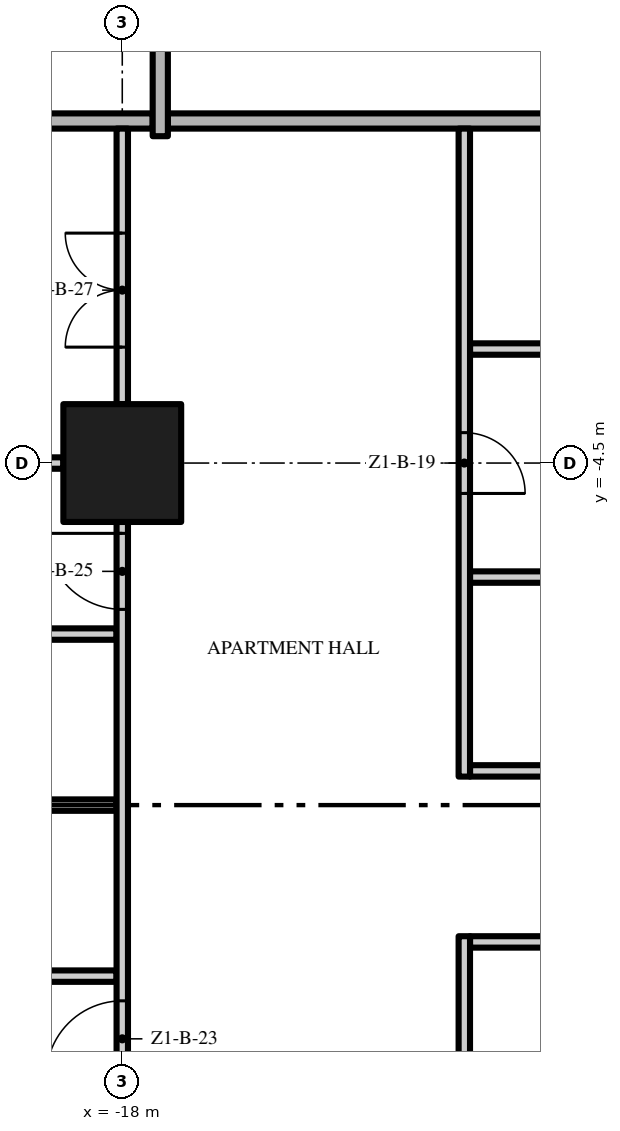
"""IFC4 building model, lengths in metres.
Left out: names, types, materials, properties, quantities, classifications, styles, units other than length and angle.
Written with IfcOpenShell. Run it as: python <this file> out.ifc"""

import sys

from ifc_helpers import new_model, si_unit, direction, frame, frame_2d, origin, origin_2d, place, context, subcontext, project, spatial, rectangle, extrude, element, fill, save


model = new_model("IFC4")
c1 = context("Model", 3, precision=1e-05, world=origin(), true_north=direction((0.0, 1.0)))
c2 = subcontext(c1, "Body", "Model", "MODEL_VIEW")
j1 = project(units=[si_unit("LENGTHUNIT", "METRE"), si_unit("PLANEANGLEUNIT", "RADIAN")], contexts=[c1])
p1 = place(None, origin())
s1 = spatial("IfcSite", under=j1, at=p1, CompositionType="ELEMENT")
p2 = place(p1, origin())
s2 = spatial("IfcBuilding", under=s1, at=p2, CompositionType="ELEMENT")
p3 = place(p2, frame((0.0, 0.0, 34.0)))
s3 = spatial("IfcBuildingStorey", under=s2, at=p3, CompositionType="ELEMENT", Elevation=34.0)
p4 = place(p3, frame((-18.0, -4.5, 0.0), z_axis=(0.0, 0.0, 1.0), x_axis=(1.0, 0.0, 0.0)))
e1 = element("IfcColumn", 1, at=p4, inside=s3, PredefinedType="COLUMN", context=c2, shape_type="SweptSolid", body=[
    extrude(rectangle(XDim=1.55, YDim=1.55, at=origin_2d()), origin(), (0.0, 0.0, 1.0), 3.5),
])
p5 = place(p3, frame((-20.925, -11.25, 0.0), z_axis=(0.0, 0.0, 1.0), x_axis=(1.0, 0.0, 0.0)))
e2 = element("IfcWall", 2, at=p5, inside=s3, PredefinedType="PARTITIONING", context=c2, shape_type="SweptSolid", body=[
    extrude(rectangle(XDim=2.85, YDim=0.15, at=frame_2d((1.425, 0.0))), origin(), (0.0, 0.0, 1.0), 3.5),
])
p6 = place(p3, frame((-9.075, -10.8, 0.0), z_axis=(0.0, 0.0, 1.0), x_axis=(-1.0, 0.0, 0.0)))
e3 = element("IfcWall", 3, at=p6, inside=s3, PredefinedType="PARTITIONING", context=c2, shape_type="SweptSolid", body=[
    extrude(rectangle(XDim=4.35, YDim=0.15, at=frame_2d((2.175, 0.0))), origin(), (0.0, 0.0, 1.0), 3.5),
])
p7 = place(p6, frame((1.7, 0.0, 0.0)))
e4 = element("IfcOpeningElement", 4, at=p7, cuts=e3, PredefinedType="OPENING", context=c2, shape_type="SweptSolid", body=[
    extrude(rectangle(XDim=0.9, YDim=2.1, at=frame_2d((0.45, 1.05))), frame((0.0, 0.085, 0.0), z_axis=(0.0, -1.0, 0.0), x_axis=(1.0, 0.0, 0.0)), (0.0, 0.0, 1.0), 0.17),
])
p8 = place(p3, frame((-20.925, -9.0, 0.0), z_axis=(0.0, 0.0, 1.0), x_axis=(1.0, 0.0, 0.0)))
e5 = element("IfcWall", 5, at=p8, inside=s3, PredefinedType="PARTITIONING", context=c2, shape_type="SweptSolid", body=[
    extrude(rectangle(XDim=2.85, YDim=0.15, at=frame_2d((1.425, 0.0))), origin(), (0.0, 0.0, 1.0), 3.5),
])
p9 = place(p3, frame((-13.425, -8.55, 0.0), z_axis=(0.0, 0.0, 1.0), x_axis=(1.0, 0.0, 0.0)))
e6 = element("IfcWall", 6, at=p9, inside=s3, PredefinedType="PARTITIONING", context=c2, shape_type="SweptSolid", body=[
    extrude(rectangle(XDim=4.35, YDim=0.15, at=frame_2d((2.175, 0.0))), origin(), (0.0, 0.0, 1.0), 3.5),
])
p10 = place(p3, frame((-20.925, -6.75, 0.0), z_axis=(0.0, 0.0, 1.0), x_axis=(1.0, 0.0, 0.0)))
e7 = element("IfcWall", 7, at=p10, inside=s3, PredefinedType="PARTITIONING", context=c2, shape_type="SweptSolid", body=[
    extrude(rectangle(XDim=2.85, YDim=0.15, at=frame_2d((1.425, 0.0))), origin(), (0.0, 0.0, 1.0), 3.5),
])
p11 = place(p3, frame((-13.425, -6.0, 0.0), z_axis=(0.0, 0.0, 1.0), x_axis=(1.0, 0.0, 0.0)))
e8 = element("IfcWall", 8, at=p11, inside=s3, PredefinedType="PARTITIONING", context=c2, shape_type="SweptSolid", body=[
    extrude(rectangle(XDim=4.35, YDim=0.15, at=frame_2d((2.175, 0.0))), origin(), (0.0, 0.0, 1.0), 3.5),
])
p12 = place(p3, frame((-25.55, -4.5, 0.0), z_axis=(0.0, 0.0, 1.0), x_axis=(1.0, 0.0, 0.0)))
e9 = element("IfcWall", 9, at=p12, inside=s3, PredefinedType="PARTITIONING", context=c2, shape_type="SweptSolid", body=[
    extrude(rectangle(XDim=6.775, YDim=0.15, at=frame_2d((3.388, 0.0))), origin(), (0.0, 0.0, 1.0), 3.5),
])
p13 = place(p3, frame((-13.425, -3.0, 0.0), z_axis=(0.0, 0.0, 1.0), x_axis=(1.0, 0.0, 0.0)))
e10 = element("IfcWall", 10, at=p13, inside=s3, PredefinedType="PARTITIONING", context=c2, shape_type="SweptSolid", body=[
    extrude(rectangle(XDim=4.35, YDim=0.15, at=frame_2d((2.175, 0.0))), origin(), (0.0, 0.0, 1.0), 3.5),
])
p14 = place(p3, frame((-17.4, 0.0, 0.0), z_axis=(0.0, 0.0, 1.0), x_axis=(1.0, 0.0, 0.0)))
e11 = element("IfcWall", 11, at=p14, inside=s3, PredefinedType="PARTITIONING", context=c2, shape_type="SweptSolid", body=[
    extrude(rectangle(XDim=12.8, YDim=0.2, at=frame_2d((6.4, 0.0))), origin(), (0.0, 0.0, 1.0), 3.5),
])
p15 = place(p3, frame((-26.7, 0.0, 0.0), z_axis=(0.0, 0.0, 1.0), x_axis=(1.0, 0.0, 0.0)))
e12 = element("IfcWall", 12, at=p15, inside=s3, PredefinedType="PARTITIONING", context=c2, shape_type="SweptSolid", body=[
    extrude(rectangle(XDim=9.1, YDim=0.2, at=frame_2d((4.55, 0.0))), origin(), (0.0, 0.0, 1.0), 3.5),
])
p16 = place(p3, frame((-18.0, -12.725, 0.0), z_axis=(0.0, 0.0, 1.0), x_axis=(0.0, 1.0, 0.0)))
e13 = element("IfcWall", 13, at=p16, inside=s3, PredefinedType="PARTITIONING", context=c2, shape_type="SweptSolid", body=[
    extrude(rectangle(XDim=7.45, YDim=0.15, at=frame_2d((3.725, 0.0))), origin(), (0.0, 0.0, 1.0), 3.5),
])
p17 = place(p16, frame((0.15, 0.0, 0.0)))
e14 = element("IfcOpeningElement", 14, at=p17, cuts=e13, PredefinedType="OPENING", context=c2, shape_type="SweptSolid", body=[
    extrude(rectangle(XDim=1.0, YDim=2.4, at=frame_2d((0.5, 1.2))), frame((0.0, 0.085, 0.0), z_axis=(0.0, -1.0, 0.0), x_axis=(1.0, 0.0, 0.0)), (0.0, 0.0, 1.0), 0.17),
])
p18 = place(p16, frame((6.3, 0.0, 0.0)))
e15 = element("IfcOpeningElement", 15, at=p18, cuts=e13, PredefinedType="OPENING", context=c2, shape_type="SweptSolid", body=[
    extrude(rectangle(XDim=1.0, YDim=2.4, at=frame_2d((0.5, 1.2))), frame((0.0, 0.085, 0.0), z_axis=(0.0, -1.0, 0.0), x_axis=(1.0, 0.0, 0.0)), (0.0, 0.0, 1.0), 0.17),
])
p19 = place(p3, frame((-18.0, -3.725, 0.0), z_axis=(0.0, 0.0, 1.0), x_axis=(0.0, 1.0, 0.0)))
e16 = element("IfcWall", 16, at=p19, inside=s3, PredefinedType="PARTITIONING", context=c2, shape_type="SweptSolid", body=[
    extrude(rectangle(XDim=3.625, YDim=0.15, at=frame_2d((1.812, 0.0))), origin(), (0.0, 0.0, 1.0), 3.5),
])
p20 = place(p19, frame((0.75, 0.0, 0.0)))
e17 = element("IfcOpeningElement", 17, at=p20, cuts=e16, PredefinedType="OPENING", context=c2, shape_type="SweptSolid", body=[
    extrude(rectangle(XDim=1.5, YDim=2.4, at=frame_2d((0.75, 1.2))), frame((0.0, 0.085, 0.0), z_axis=(0.0, -1.0, 0.0), x_axis=(1.0, 0.0, 0.0)), (0.0, 0.0, 1.0), 0.17),
])
p21 = place(p3, frame((-17.5, -0.2, 0.0), z_axis=(0.0, 0.0, 1.0), x_axis=(0.0, 1.0, 0.0)))
e18 = element("IfcWall", 18, at=p21, inside=s3, PredefinedType="PARTITIONING", context=c2, shape_type="SweptSolid", body=[
    extrude(rectangle(XDim=3.925, YDim=0.2, at=frame_2d((1.962, 0.0))), origin(), (0.0, 0.0, 1.0), 3.5),
])
p22 = place(p3, frame((-13.5, -10.725, 0.0), z_axis=(0.0, 0.0, 1.0), x_axis=(0.0, -1.0, 0.0)))
e19 = element("IfcWall", 19, at=p22, inside=s3, PredefinedType="PARTITIONING", context=c2, shape_type="SweptSolid", body=[
    extrude(rectangle(XDim=11.475, YDim=0.15, at=frame_2d((5.737, 0.0))), origin(), (0.0, 0.0, 1.0), 3.5),
])
p23 = place(p22, frame((10.475, 0.0, 0.0)))
e20 = element("IfcOpeningElement", 20, at=p23, cuts=e19, PredefinedType="OPENING", context=c2, shape_type="SweptSolid", body=[
    extrude(rectangle(XDim=0.8, YDim=2.0, at=frame_2d((0.4, 1.0))), frame((0.0, 0.085, 0.0), z_axis=(0.0, -1.0, 0.0), x_axis=(1.0, 0.0, 0.0)), (0.0, 0.0, 1.0), 0.17),
])
p24 = place(p22, frame((4.825, 0.0, 0.0)))
e21 = element("IfcOpeningElement", 21, at=p24, cuts=e19, PredefinedType="OPENING", context=c2, shape_type="SweptSolid", body=[
    extrude(rectangle(XDim=1.0, YDim=2.4, at=frame_2d((0.5, 1.2))), frame((0.0, 0.085, 0.0), z_axis=(0.0, -1.0, 0.0), x_axis=(1.0, 0.0, 0.0)), (0.0, 0.0, 1.0), 0.17),
])
p25 = place(p3, frame((-13.5, -0.1, 0.0), z_axis=(0.0, 0.0, 1.0), x_axis=(0.0, -1.0, 0.0)))
e22 = element("IfcWall", 22, at=p25, inside=s3, PredefinedType="PARTITIONING", context=c2, shape_type="SweptSolid", body=[
    extrude(rectangle(XDim=8.525, YDim=0.15, at=frame_2d((4.263, 0.0))), origin(), (0.0, 0.0, 1.0), 3.5),
])
p26 = place(p25, frame((4.0, 0.0, 0.0)))
e23 = element("IfcOpeningElement", 23, at=p26, cuts=e22, PredefinedType="OPENING", context=c2, shape_type="SweptSolid", body=[
    extrude(rectangle(XDim=0.8, YDim=2.0, at=frame_2d((0.4, 1.0))), frame((0.0, 0.085, 0.0), z_axis=(0.0, -1.0, 0.0), x_axis=(1.0, 0.0, 0.0)), (0.0, 0.0, 1.0), 0.17),
])
p27 = place(p26, origin())
e24 = element("IfcDoor", 24, at=p27, inside=s3, OperationType="SINGLE_SWING_RIGHT", PredefinedType="DOOR", context=c2, shape_type="SweptSolid", body=[
    extrude(rectangle(XDim=0.8, YDim=2.0, at=frame_2d((0.4, 1.0))), frame((0.0, 0.025, 0.0), z_axis=(0.0, -1.0, 0.0), x_axis=(1.0, 0.0, 0.0)), (0.0, 0.0, 1.0), 0.05),
])
fill(e23, e24)
p28 = place(p17, origin())
e25 = element("IfcDoor", 25, at=p28, inside=s3, OperationType="SINGLE_SWING_LEFT", PredefinedType="DOOR", context=c2, shape_type="SweptSolid", body=[
    extrude(rectangle(XDim=1.0, YDim=2.4, at=frame_2d((0.5, 1.2))), frame((0.0, 0.025, 0.0), z_axis=(0.0, -1.0, 0.0), x_axis=(1.0, 0.0, 0.0)), (0.0, 0.0, 1.0), 0.05),
])
fill(e14, e25)
p29 = place(p18, origin())
e26 = element("IfcDoor", 26, at=p29, inside=s3, OperationType="SINGLE_SWING_RIGHT", PredefinedType="DOOR", context=c2, shape_type="SweptSolid", body=[
    extrude(rectangle(XDim=1.0, YDim=2.4, at=frame_2d((0.5, 1.2))), frame((0.0, 0.025, 0.0), z_axis=(0.0, -1.0, 0.0), x_axis=(1.0, 0.0, 0.0)), (0.0, 0.0, 1.0), 0.05),
])
fill(e15, e26)
p30 = place(p20, origin())
e27 = element("IfcDoor", 27, at=p30, inside=s3, OperationType="DOUBLE_DOOR_SINGLE_SWING", PredefinedType="DOOR", context=c2, shape_type="SweptSolid", body=[
    extrude(rectangle(XDim=1.5, YDim=2.4, at=frame_2d((0.75, 1.2))), frame((0.0, 0.025, 0.0), z_axis=(0.0, -1.0, 0.0), x_axis=(1.0, 0.0, 0.0)), (0.0, 0.0, 1.0), 0.05),
])
fill(e17, e27)
save(model, sys.argv[1])
